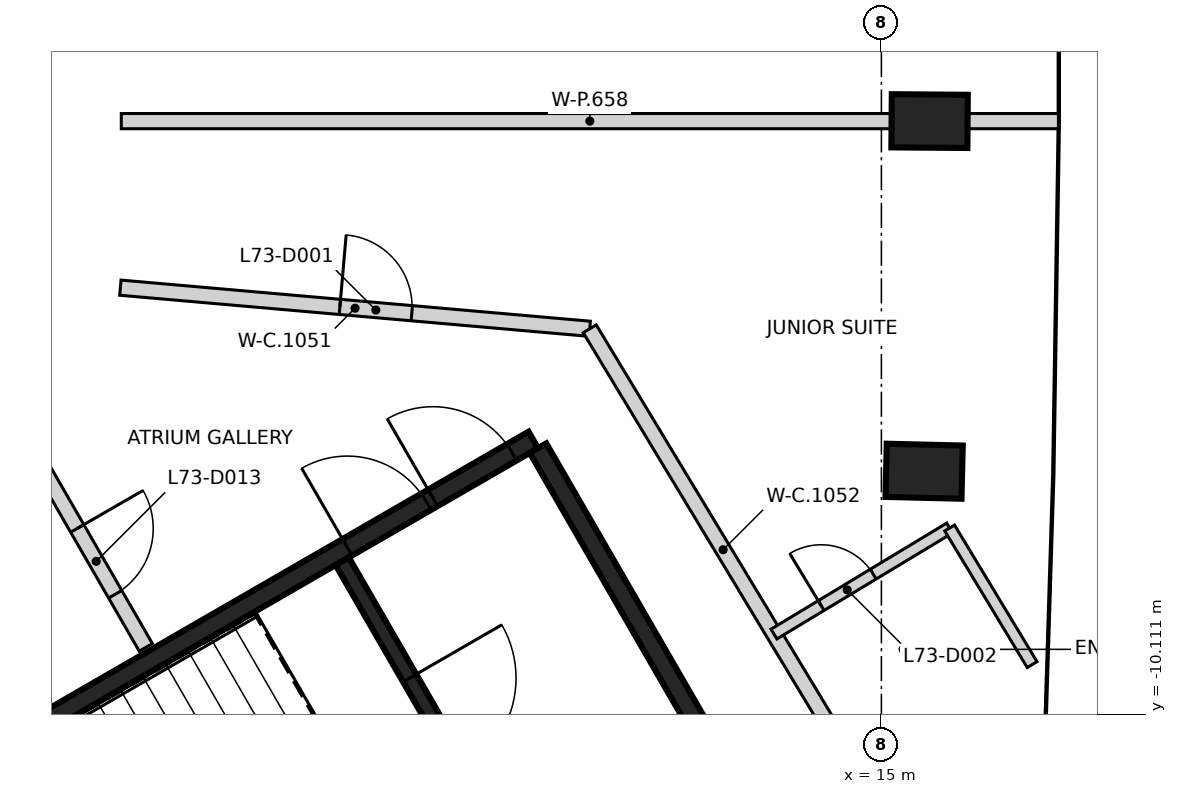
"""IFC4 building model, lengths in metres.
Left out: names, types, materials, properties, quantities, classifications, styles, units other than length and angle.
Written with IfcOpenShell. Run it as: python <this file> out.ifc"""

import sys

from ifc_helpers import new_model, si_unit, direction, frame, frame_2d, origin, origin_2d, place, context, subcontext, project, spatial, rectangle, extrude, element, fill, save


model = new_model("IFC4")
c1 = context("Model", 3, precision=1e-05, world=origin(), true_north=direction((0.0, 1.0)))
c2 = subcontext(c1, "Body", "Model", "MODEL_VIEW")
j1 = project(units=[si_unit("LENGTHUNIT", "METRE"), si_unit("PLANEANGLEUNIT", "RADIAN")], contexts=[c1])
p1 = place(None, origin())
s1 = spatial("IfcSite", under=j1, at=p1, CompositionType="ELEMENT")
p2 = place(p1, origin())
s2 = spatial("IfcBuilding", under=s1, at=p2, CompositionType="ELEMENT")
p3 = place(p2, frame((0.0, 0.0, 291.0)))
s3 = spatial("IfcBuildingStorey", under=s2, at=p3, CompositionType="ELEMENT", Elevation=291.0)
for number, where, z_axis, x_axis in (
    (1, (15.562, -6.91, -0.35), (0.0, 0.0, 1.0), (-1.0, 0.024, 0.0)),
    (2, (15.634, -2.303, -0.35), (0.0, 0.0, 1.0), (-1.0, 0.008, 0.0)),
):
    element("IfcColumn", number, at=place(p3, frame(where, z_axis=z_axis, x_axis=x_axis)), inside=s3, PredefinedType="COLUMN", context=c2, shape_type="SweptSolid", body=[
        extrude(rectangle(XDim=1.0, YDim=0.7, at=origin_2d()), origin(), (0.0, 0.0, 1.0), 3.6),
    ])
p4 = place(p3, frame((0.417, -12.273, 0.0), z_axis=(0.0, 0.0, 1.0), x_axis=(0.866021906294, 0.500006057782, 0.0)))
e3 = element("IfcWall", 3, at=p4, inside=s3, PredefinedType="SHEAR", context=c2, shape_type="SweptSolid", body=[
    extrude(rectangle(XDim=11.55, YDim=0.25, at=frame_2d((5.775, 0.0))), origin(), (0.0, 0.0, 1.0), 3.25),
])
p5 = place(p4, frame((10.025, 0.0, 0.0)))
e4 = element("IfcOpeningElement", 4, at=p5, cuts=e3, PredefinedType="OPENING", context=c2, shape_type="SweptSolid", body=[
    extrude(rectangle(XDim=1.2, YDim=2.1, at=frame_2d((0.6, 1.05))), frame((0.0, 0.135, 0.0), z_axis=(0.0, -1.0, 0.0), x_axis=(1.0, 0.0, 0.0)), (0.0, 0.0, 1.0), 0.27),
])
p6 = place(p4, frame((8.725, 0.0, 0.0)))
e5 = element("IfcOpeningElement", 5, at=p6, cuts=e3, PredefinedType="OPENING", context=c2, shape_type="SweptSolid", body=[
    extrude(rectangle(XDim=1.2, YDim=2.1, at=frame_2d((0.6, 1.05))), frame((0.0, 0.135, 0.0), z_axis=(0.0, -1.0, 0.0), x_axis=(1.0, 0.0, 0.0)), (0.0, 0.0, 1.0), 0.27),
])
p7 = place(p3, frame((10.483, -6.606, 0.0), z_axis=(0.0, 0.0, 1.0), x_axis=(0.49999885962, -0.866026062182, 0.0)))
e6 = element("IfcWall", 6, at=p7, inside=s3, PredefinedType="SHEAR", context=c2, shape_type="SweptSolid", body=[
    extrude(rectangle(XDim=5.225, YDim=0.25, at=frame_2d((2.612, 0.0))), origin(), (0.0, 0.0, 1.0), 3.25),
])
p8 = place(p3, frame((7.906, -8.094, 0.0), z_axis=(0.0, 0.0, 1.0), x_axis=(0.500027839223, -0.866009330205, 0.0)))
e7 = element("IfcWall", 7, at=p8, inside=s3, PredefinedType="SHEAR", context=c2, shape_type="SweptSolid", body=[
    extrude(rectangle(XDim=5.098, YDim=0.2, at=frame_2d((2.549, 0.0))), origin(), (0.0, 0.0, 1.0), 3.25),
])
p9 = place(p8, frame((1.774, 0.0, 0.0)))
e8 = element("IfcOpeningElement", 8, at=p9, cuts=e7, PredefinedType="OPENING", context=c2, shape_type="SweptSolid", body=[
    extrude(rectangle(XDim=1.4, YDim=2.1, at=frame_2d((0.7, 1.05))), frame((0.0, 0.11, 0.0), z_axis=(0.0, -1.0, 0.0), x_axis=(1.0, 0.0, 0.0)), (0.0, 0.0, 1.0), 0.22),
])
p10 = place(p3, frame((3.987, -6.911, 0.0), z_axis=(0.0, 0.0, 1.0), x_axis=(0.499458942258, -0.866337558345, 0.0)))
e9 = element("IfcWall", 9, at=p10, inside=s3, PredefinedType="PARTITIONING", context=c2, shape_type="SweptSolid", body=[
    extrude(rectangle(XDim=2.674, YDim=0.2, at=frame_2d((1.337, 0.0))), origin(), (0.0, 0.0, 1.0), 3.25),
])
p11 = place(p10, frame((0.867, 0.0, 0.0)))
e10 = element("IfcOpeningElement", 10, at=p11, cuts=e9, PredefinedType="OPENING", context=c2, shape_type="SweptSolid", body=[
    extrude(rectangle(XDim=1.0, YDim=2.1, at=frame_2d((0.5, 1.05))), frame((0.0, 0.11, 0.0), z_axis=(0.0, -1.0, 0.0), x_axis=(1.0, 0.0, 0.0)), (0.0, 0.0, 1.0), 0.22),
])
p12 = place(p3, frame((4.988, -4.495, 0.0), z_axis=(0.0, 0.0, 1.0), x_axis=(0.996187344936, -0.087239748904, 0.0)))
e11 = element("IfcWall", 11, at=p12, inside=s3, PredefinedType="PARTITIONING", context=c2, shape_type="SweptSolid", body=[
    extrude(rectangle(XDim=6.199, YDim=0.2, at=frame_2d((3.099, 0.0))), origin(), (0.0, 0.0, 1.0), 3.25),
])
p13 = place(p12, frame((2.899, 0.0, 0.0)))
e12 = element("IfcOpeningElement", 12, at=p13, cuts=e11, PredefinedType="OPENING", context=c2, shape_type="SweptSolid", body=[
    extrude(rectangle(XDim=0.95, YDim=2.1, at=frame_2d((0.475, 1.05))), frame((0.0, 0.11, 0.0), z_axis=(0.0, -1.0, 0.0), x_axis=(1.0, 0.0, 0.0)), (0.0, 0.0, 1.0), 0.22),
])
p14 = place(p3, frame((11.163, -5.036, 0.0), z_axis=(0.0, 0.0, 1.0), x_axis=(0.516730398198, -0.856148173845, 0.0)))
e13 = element("IfcWall", 13, at=p14, inside=s3, PredefinedType="PARTITIONING", context=c2, shape_type="SweptSolid", body=[
    extrude(rectangle(XDim=6.791, YDim=0.2, at=frame_2d((3.396, 0.0))), origin(), (0.0, 0.0, 1.0), 3.25),
])
p15 = place(p3, frame((5.0, -2.304, 0.0), z_axis=(0.0, 0.0, 1.0), x_axis=(1.0, 0.0, 0.0)))
e14 = element("IfcWall", 14, at=p15, inside=s3, PredefinedType="PARTITIONING", context=c2, shape_type="SweptSolid", body=[
    extrude(rectangle(XDim=12.329, YDim=0.2, at=frame_2d((6.165, 0.0))), origin(), (0.0, 0.0, 1.0), 3.25),
])
p16 = place(p3, frame((13.587, -9.052, 0.0), z_axis=(0.0, 0.0, 1.0), x_axis=(0.856117294569, 0.516781557275, 0.0)))
e15 = element("IfcWall", 15, at=p16, inside=s3, PredefinedType="PARTITIONING", context=c2, shape_type="SweptSolid", body=[
    extrude(rectangle(XDim=2.699, YDim=0.15, at=frame_2d((1.35, 0.0))), origin(), (0.0, 0.0, 1.0), 2.35),
])
p17 = place(p16, frame((0.725, 0.0, 0.0)))
e16 = element("IfcOpeningElement", 16, at=p17, cuts=e15, PredefinedType="OPENING", context=c2, shape_type="SweptSolid", body=[
    extrude(rectangle(XDim=0.8, YDim=2.1, at=frame_2d((0.4, 1.05))), frame((0.0, 0.085, 0.0), z_axis=(0.0, -1.0, 0.0), x_axis=(1.0, 0.0, 0.0)), (0.0, 0.0, 1.0), 0.17),
])
p18 = place(p3, frame((15.898, -7.657, 0.0), z_axis=(0.0, 0.0, 1.0), x_axis=(0.516836936411, -0.856083863393, 0.0)))
e17 = element("IfcWall", 17, at=p18, inside=s3, PredefinedType="PARTITIONING", context=c2, shape_type="SweptSolid", body=[
    extrude(rectangle(XDim=2.099, YDim=0.15, at=frame_2d((1.05, 0.0))), origin(), (0.0, 0.0, 1.0), 3.25),
])
p19 = place(p5, origin())
e18 = element("IfcDoor", 18, at=p19, inside=s3, OperationType="SINGLE_SWING_LEFT", PredefinedType="DOOR", context=c2, shape_type="SweptSolid", body=[
    extrude(rectangle(XDim=1.2, YDim=2.1, at=frame_2d((0.6, 1.05))), frame((0.0, 0.025, 0.0), z_axis=(0.0, -1.0, 0.0), x_axis=(1.0, 0.0, 0.0)), (0.0, 0.0, 1.0), 0.05),
])
fill(e4, e18)
p20 = place(p6, origin())
e19 = element("IfcDoor", 19, at=p20, inside=s3, OperationType="SINGLE_SWING_RIGHT", PredefinedType="DOOR", context=c2, shape_type="SweptSolid", body=[
    extrude(rectangle(XDim=1.2, YDim=2.1, at=frame_2d((0.6, 1.05))), frame((0.0, 0.025, 0.0), z_axis=(0.0, -1.0, 0.0), x_axis=(1.0, 0.0, 0.0)), (0.0, 0.0, 1.0), 0.05),
])
fill(e5, e19)
p21 = place(p9, origin())
e20 = element("IfcDoor", 20, at=p21, inside=s3, OperationType="SINGLE_SWING_RIGHT", PredefinedType="DOOR", context=c2, shape_type="SweptSolid", body=[
    extrude(rectangle(XDim=1.4, YDim=2.1, at=frame_2d((0.7, 1.05))), frame((0.0, 0.025, 0.0), z_axis=(0.0, -1.0, 0.0), x_axis=(1.0, 0.0, 0.0)), (0.0, 0.0, 1.0), 0.05),
])
fill(e8, e20)
p22 = place(p13, frame((0.95, 0.0, 0.0), z_axis=(0.0, 0.0, 1.0), x_axis=(-1.0, 0.0, 0.0)))
e21 = element("IfcDoor", 21, at=p22, inside=s3, OperationType="SINGLE_SWING_LEFT", PredefinedType="DOOR", context=c2, shape_type="SweptSolid", body=[
    extrude(rectangle(XDim=0.95, YDim=2.1, at=frame_2d((0.475, 1.05))), frame((0.0, 0.025, 0.0), z_axis=(0.0, -1.0, 0.0), x_axis=(1.0, 0.0, 0.0)), (0.0, 0.0, 1.0), 0.05),
])
fill(e12, e21)
p23 = place(p17, origin())
e22 = element("IfcDoor", 22, at=p23, inside=s3, OperationType="SINGLE_SWING_LEFT", PredefinedType="DOOR", context=c2, shape_type="SweptSolid", body=[
    extrude(rectangle(XDim=0.8, YDim=2.1, at=frame_2d((0.4, 1.05))), frame((0.0, 0.025, 0.0), z_axis=(0.0, -1.0, 0.0), x_axis=(1.0, 0.0, 0.0)), (0.0, 0.0, 1.0), 0.05),
])
fill(e16, e22)
p24 = place(p11, frame((1.0, 0.0, 0.0), z_axis=(0.0, 0.0, 1.0), x_axis=(-1.0, 0.0, 0.0)))
e23 = element("IfcDoor", 23, at=p24, inside=s3, OperationType="SINGLE_SWING_LEFT", PredefinedType="DOOR", context=c2, shape_type="SweptSolid", body=[
    extrude(rectangle(XDim=1.0, YDim=2.1, at=frame_2d((0.5, 1.05))), frame((0.0, 0.025, 0.0), z_axis=(0.0, -1.0, 0.0), x_axis=(1.0, 0.0, 0.0)), (0.0, 0.0, 1.0), 0.05),
])
fill(e10, e23)
save(model, sys.argv[1])
